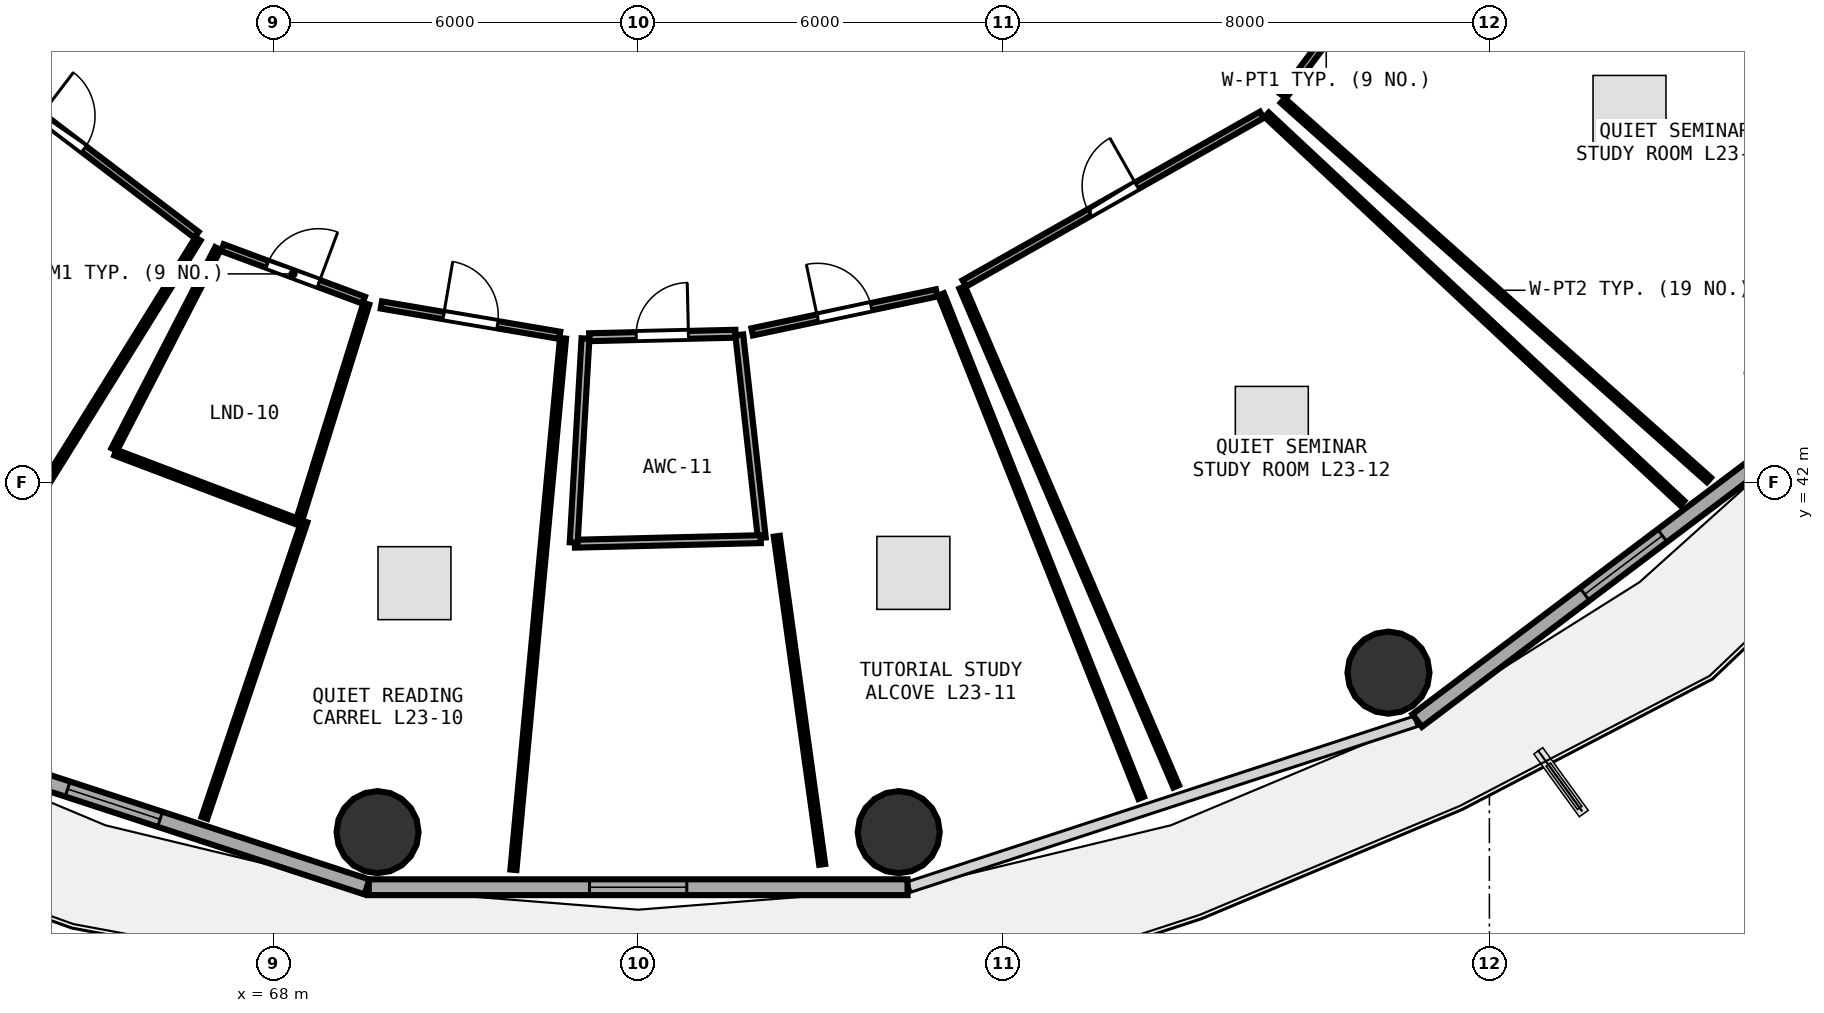
"""IFC4 building model, lengths in metres.
Left out: names, types, materials, properties, quantities, classifications, styles, units other than length and angle.
Written with IfcOpenShell. Run it as: python <this file> out.ifc"""

import sys

from ifc_helpers import new_model, si_unit, direction, frame, frame_2d, origin, origin_2d, place, context, subcontext, project, spatial, rectangle, circle, extrude, element, fill, save


model = new_model("IFC4")
c1 = context("Model", 3, precision=1e-05, world=origin(), true_north=direction((0.0, 1.0)))
c2 = subcontext(c1, "Body", "Model", "MODEL_VIEW")
j1 = project(units=[si_unit("LENGTHUNIT", "METRE"), si_unit("PLANEANGLEUNIT", "RADIAN")], contexts=[c1])
p1 = place(None, origin())
s1 = spatial("IfcSite", under=j1, at=p1, CompositionType="ELEMENT")
p2 = place(p1, origin())
s2 = spatial("IfcBuilding", under=s1, at=p2, CompositionType="ELEMENT")
p3 = place(p2, frame((0.0, 0.0, 91.35)))
s3 = spatial("IfcBuildingStorey", under=s2, at=p3, CompositionType="ELEMENT", Elevation=91.35)
for number, where, z_axis, x_axis in (
    (1, (69.714, 36.255, 0.0), (0.0, 0.0, 1.0), (1.0, 0.0, 0.0)),
    (2, (78.286, 36.255, 0.0), (0.0, 0.0, 1.0), (1.0, 0.0, 0.0)),
    (3, (86.34, 38.878, 0.0), (0.0, 0.0, 1.0), (1.0, 0.0, 0.0)),
):
    element("IfcColumn", number, at=place(p3, frame(where, z_axis=z_axis, x_axis=x_axis)), inside=s3, PredefinedType="COLUMN", context=c2, shape_type="SweptSolid", body=[
        extrude(circle(Radius=0.675, at=origin_2d()), origin(), (0.0, 0.0, 1.0), 3.75),
    ])
p4 = place(p3, frame((61.214, 38.077, 0.0), z_axis=(0.0, 0.0, 1.0), x_axis=(0.950471101963, -0.310812941064, 0.0)))
e4 = element("IfcWall", 4, at=p4, inside=s3, PredefinedType="SOLIDWALL", context=c2, shape_type="SweptSolid", body=[
    extrude(rectangle(XDim=8.76, YDim=0.26, at=frame_2d((4.38, 0.0))), origin(), (0.0, 0.0, 1.0), 3.475),
])
p5 = place(p4, frame((3.58, 0.0, 0.85)))
e5 = element("IfcOpeningElement", 5, at=p5, cuts=e4, PredefinedType="OPENING", context=c2, shape_type="SweptSolid", body=[
    extrude(rectangle(XDim=1.6, YDim=1.45, at=frame_2d((0.8, 0.725))), frame((0.0, 0.14, 0.0), z_axis=(0.0, -1.0, 0.0), x_axis=(1.0, 0.0, 0.0)), (0.0, 0.0, 1.0), 0.28),
])
p6 = place(p3, frame((69.57, 35.349, 0.0), z_axis=(0.0, 0.0, 1.0), x_axis=(1.0, 0.0, 0.0)))
e6 = element("IfcWall", 6, at=p6, inside=s3, PredefinedType="SOLIDWALL", context=c2, shape_type="SweptSolid", body=[
    extrude(rectangle(XDim=8.861, YDim=0.26, at=frame_2d((4.43, 0.0))), origin(), (0.0, 0.0, 1.0), 3.475),
])
p7 = place(p6, frame((3.63, 0.0, 0.85)))
e7 = element("IfcOpeningElement", 7, at=p7, cuts=e6, PredefinedType="OPENING", context=c2, shape_type="SweptSolid", body=[
    extrude(rectangle(XDim=1.6, YDim=1.45, at=frame_2d((0.8, 0.725))), frame((0.0, 0.14, 0.0), z_axis=(0.0, -1.0, 0.0), x_axis=(1.0, 0.0, 0.0)), (0.0, 0.0, 1.0), 0.28),
])
p8 = place(p3, frame((86.812, 38.09, 0.0), z_axis=(0.0, 0.0, 1.0), x_axis=(0.798501507879, 0.601992808857, 0.0)))
e8 = element("IfcWall", 8, at=p8, inside=s3, PredefinedType="SOLIDWALL", context=c2, shape_type="SweptSolid", body=[
    extrude(rectangle(XDim=8.499, YDim=0.26, at=frame_2d((4.25, 0.0))), origin(), (0.0, 0.0, 1.0), 3.475),
])
p9 = place(p8, frame((3.45, 0.0, 0.85)))
e9 = element("IfcOpeningElement", 9, at=p9, cuts=e8, PredefinedType="OPENING", context=c2, shape_type="SweptSolid", body=[
    extrude(rectangle(XDim=1.6, YDim=1.45, at=frame_2d((0.8, 0.725))), frame((0.0, 0.14, 0.0), z_axis=(0.0, -1.0, 0.0), x_axis=(1.0, 0.0, 0.0)), (0.0, 0.0, 1.0), 0.28),
])
p10 = place(p3, frame((62.318, 49.442, 0.0), z_axis=(0.0, 0.0, 1.0), x_axis=(0.795762794985, -0.605608432997, 0.0)))
e10 = element("IfcWall", 10, at=p10, inside=s3, PredefinedType="PARTITIONING", context=c2, shape_type="SweptSolid", body=[
    extrude(rectangle(XDim=5.55, YDim=0.12, at=frame_2d((2.775, 0.0))), origin(), (0.0, 0.0, 1.0), 2.925),
])
p11 = place(p10, frame((2.325, 0.0, 0.0)))
e11 = element("IfcOpeningElement", 11, at=p11, cuts=e10, PredefinedType="OPENING", context=c2, shape_type="SweptSolid", body=[
    extrude(rectangle(XDim=0.9, YDim=2.08, at=frame_2d((0.45, 1.04))), frame((0.0, 0.07, 0.0), z_axis=(0.0, -1.0, 0.0), x_axis=(1.0, 0.0, 0.0)), (0.0, 0.0, 1.0), 0.14),
])
p12 = place(p3, frame((67.162, 45.867, 0.0), z_axis=(0.0, 0.0, 1.0), x_axis=(0.937401389833, -0.348250821018, 0.0)))
e12 = element("IfcWall", 12, at=p12, inside=s3, PredefinedType="PARTITIONING", context=c2, shape_type="SweptSolid", body=[
    extrude(rectangle(XDim=2.479, YDim=0.12, at=frame_2d((1.24, 0.0))), origin(), (0.0, 0.0, 1.0), 2.925),
])
p13 = place(p12, frame((0.789, 0.0, 0.0)))
e13 = element("IfcOpeningElement", 13, at=p13, cuts=e12, PredefinedType="OPENING", context=c2, shape_type="SweptSolid", body=[
    extrude(rectangle(XDim=0.9, YDim=2.08, at=frame_2d((0.45, 1.04))), frame((0.0, 0.07, 0.0), z_axis=(0.0, -1.0, 0.0), x_axis=(1.0, 0.0, 0.0)), (0.0, 0.0, 1.0), 0.14),
])
p14 = place(p3, frame((69.777, 44.925, 0.0), z_axis=(0.0, 0.0, 1.0), x_axis=(0.985835901267, -0.167712777608, 0.0)))
e14 = element("IfcWall", 14, at=p14, inside=s3, PredefinedType="PARTITIONING", context=c2, shape_type="SweptSolid", body=[
    extrude(rectangle(XDim=2.974, YDim=0.12, at=frame_2d((1.487, 0.0))), origin(), (0.0, 0.0, 1.0), 3.48),
])
p15 = place(p14, frame((1.037, 0.0, 0.0)))
e15 = element("IfcOpeningElement", 15, at=p15, cuts=e14, PredefinedType="OPENING", context=c2, shape_type="SweptSolid", body=[
    extrude(rectangle(XDim=0.9, YDim=2.08, at=frame_2d((0.45, 1.04))), frame((0.0, 0.07, 0.0), z_axis=(0.0, -1.0, 0.0), x_axis=(1.0, 0.0, 0.0)), (0.0, 0.0, 1.0), 0.14),
])
p16 = place(p3, frame((73.195, 44.394, 0.0), z_axis=(0.0, 0.0, 1.0), x_axis=(0.999715810971, 0.023838986867, 0.0)))
e16 = element("IfcWall", 16, at=p16, inside=s3, PredefinedType="PLUMBINGWALL", context=c2, shape_type="SweptSolid", body=[
    extrude(rectangle(XDim=2.407, YDim=0.13, at=frame_2d((1.203, 0.0))), origin(), (0.0, 0.0, 1.0), 3.48),
])
p17 = place(p16, frame((0.773, 0.0, 0.0)))
e17 = element("IfcOpeningElement", 17, at=p17, cuts=e16, PredefinedType="OPENING", context=c2, shape_type="SweptSolid", body=[
    extrude(rectangle(XDim=0.86, YDim=2.05, at=frame_2d((0.43, 1.025))), frame((0.0, 0.075, 0.0), z_axis=(0.0, -1.0, 0.0), x_axis=(1.0, 0.0, 0.0)), (0.0, 0.0, 1.0), 0.15),
])
p18 = place(p3, frame((75.876, 44.482, 0.0), z_axis=(0.0, 0.0, 1.0), x_axis=(0.978387400111, 0.206780306856, 0.0)))
e18 = element("IfcWall", 18, at=p18, inside=s3, PredefinedType="PARTITIONING", context=c2, shape_type="SweptSolid", body=[
    extrude(rectangle(XDim=3.1, YDim=0.12, at=frame_2d((1.55, 0.0))), origin(), (0.0, 0.0, 1.0), 3.48),
])
p19 = place(p18, frame((1.1, 0.0, 0.0)))
e19 = element("IfcOpeningElement", 19, at=p19, cuts=e18, PredefinedType="OPENING", context=c2, shape_type="SweptSolid", body=[
    extrude(rectangle(XDim=0.9, YDim=2.08, at=frame_2d((0.45, 1.04))), frame((0.0, 0.07, 0.0), z_axis=(0.0, -1.0, 0.0), x_axis=(1.0, 0.0, 0.0)), (0.0, 0.0, 1.0), 0.14),
])
p20 = place(p3, frame((79.365, 45.28, 0.0), z_axis=(0.0, 0.0, 1.0), x_axis=(0.870068136537, 0.49293147372, 0.0)))
e20 = element("IfcWall", 20, at=p20, inside=s3, PredefinedType="PARTITIONING", context=c2, shape_type="SweptSolid", body=[
    extrude(rectangle(XDim=5.621, YDim=0.12, at=frame_2d((2.811, 0.0))), origin(), (0.0, 0.0, 1.0), 2.925),
])
p21 = place(p20, frame((2.36, 0.0, 0.0)))
e21 = element("IfcOpeningElement", 21, at=p21, cuts=e20, PredefinedType="OPENING", context=c2, shape_type="SweptSolid", body=[
    extrude(rectangle(XDim=0.9, YDim=2.08, at=frame_2d((0.45, 1.04))), frame((0.0, 0.07, 0.0), z_axis=(0.0, -1.0, 0.0), x_axis=(1.0, 0.0, 0.0)), (0.0, 0.0, 1.0), 0.14),
])
p22 = place(p3, frame((84.608, 48.36, 0.0), z_axis=(0.0, 0.0, 1.0), x_axis=(0.596833425992, 0.802365167251, 0.0)))
e22 = element("IfcWall", 22, at=p22, inside=s3, PredefinedType="PARTITIONING", context=c2, shape_type="SweptSolid", body=[
    extrude(rectangle(XDim=5.399, YDim=0.12, at=frame_2d((2.699, 0.0))), origin(), (0.0, 0.0, 1.0), 2.925),
])
p23 = place(p22, frame((2.249, 0.0, 0.0)))
e23 = element("IfcOpeningElement", 23, at=p23, cuts=e22, PredefinedType="OPENING", context=c2, shape_type="SweptSolid", body=[
    extrude(rectangle(XDim=0.9, YDim=2.08, at=frame_2d((0.45, 1.04))), frame((0.0, 0.07, 0.0), z_axis=(0.0, -1.0, 0.0), x_axis=(1.0, 0.0, 0.0)), (0.0, 0.0, 1.0), 0.14),
])
p24 = place(p3, frame((66.761, 46.01, 0.0), z_axis=(0.0, 0.0, 1.0), x_axis=(-0.528015738644, -0.849234584638, 0.0)))
e24 = element("IfcWall", 24, at=p24, inside=s3, PredefinedType="PARTITIONING", context=c2, shape_type="SweptSolid", body=[
    extrude(rectangle(XDim=8.338, YDim=0.1, at=frame_2d((4.169, 0.0))), origin(), (0.0, 0.0, 1.0), 3.175),
])
p25 = place(p3, frame((69.53, 44.945, 0.0), z_axis=(0.0, 0.0, 1.0), x_axis=(-0.296510682072, -0.955029536411, 0.0)))
e25 = element("IfcWall", 25, at=p25, inside=s3, PredefinedType="PARTITIONING", context=c2, shape_type="SweptSolid", body=[
    extrude(rectangle(XDim=3.72, YDim=0.1, at=frame_2d((1.86, 0.0))), origin(), (0.0, 0.0, 1.0), 2.925),
])
p26 = place(p3, frame((68.378, 41.368, 0.0), z_axis=(0.0, 0.0, 1.0), x_axis=(-0.935027341219, 0.354575621233, 0.0)))
e26 = element("IfcWall", 26, at=p26, inside=s3, PredefinedType="PARTITIONING", context=c2, shape_type="SweptSolid", body=[
    extrude(rectangle(XDim=3.183, YDim=0.1, at=frame_2d((1.592, 0.0))), origin(), (0.0, 0.0, 1.0), 2.925),
])
p27 = place(p3, frame((65.382, 42.546, 0.0), z_axis=(0.0, 0.0, 1.0), x_axis=(0.458413879464, 0.888738834031, 0.0)))
e27 = element("IfcWall", 27, at=p27, inside=s3, PredefinedType="PARTITIONING", context=c2, shape_type="SweptSolid", body=[
    extrude(rectangle(XDim=3.72, YDim=0.1, at=frame_2d((1.86, 0.0))), origin(), (0.0, 0.0, 1.0), 3.175),
])
p28 = place(p3, frame((72.764, 44.376, 0.0), z_axis=(0.0, 0.0, 1.0), x_axis=(-0.092917687898, -0.995673793607, 0.0)))
e28 = element("IfcWall", 28, at=p28, inside=s3, PredefinedType="PARTITIONING", context=c2, shape_type="SweptSolid", body=[
    extrude(rectangle(XDim=8.779, YDim=0.1, at=frame_2d((4.389, 0.0))), origin(), (0.0, 0.0, 1.0), 2.975),
])
p29 = place(p3, frame((66.867, 36.49, 0.0), z_axis=(0.0, 0.0, 1.0), x_axis=(0.319911741109, 0.947447348353, 0.0)))
e29 = element("IfcWall", 29, at=p29, inside=s3, PredefinedType="PARTITIONING", context=c2, shape_type="SweptSolid", body=[
    extrude(rectangle(XDim=5.146, YDim=0.1, at=frame_2d((2.573, 0.0))), origin(), (0.0, 0.0, 1.0), 2.925),
])
p30 = place(p3, frame((75.663, 44.433, 0.0), z_axis=(0.0, 0.0, 1.0), x_axis=(0.110311886913, -0.993897020624, 0.0)))
e30 = element("IfcWall", 30, at=p30, inside=s3, PredefinedType="PLUMBINGWALL", context=c2, shape_type="SweptSolid", body=[
    extrude(rectangle(XDim=3.36, YDim=0.13, at=frame_2d((1.68, 0.0))), origin(), (0.0, 0.0, 1.0), 3.175),
])
p31 = place(p3, frame((76.016, 41.073, 0.0), z_axis=(0.0, 0.0, 1.0), x_axis=(-0.999699597441, -0.024509485419, 0.0)))
e31 = element("IfcWall", 31, at=p31, inside=s3, PredefinedType="PLUMBINGWALL", context=c2, shape_type="SweptSolid", body=[
    extrude(rectangle(XDim=3.058, YDim=0.13, at=frame_2d((1.529, 0.0))), origin(), (0.0, 0.0, 1.0), 3.48),
])
p32 = place(p3, frame((72.94, 41.018, 0.0), z_axis=(0.0, 0.0, 1.0), x_axis=(0.057610459658, 0.998339138238, 0.0)))
e32 = element("IfcWall", 32, at=p32, inside=s3, PredefinedType="PLUMBINGWALL", context=c2, shape_type="SweptSolid", body=[
    extrude(rectangle(XDim=3.361, YDim=0.13, at=frame_2d((1.68, 0.0))), origin(), (0.0, 0.0, 1.0), 3.175),
])
p33 = place(p3, frame((78.983, 45.099, 0.0), z_axis=(0.0, 0.0, 1.0), x_axis=(0.369438475108, -0.929255192673, 0.0)))
e33 = element("IfcWall", 33, at=p33, inside=s3, PredefinedType="PARTITIONING", context=c2, shape_type="SweptSolid", body=[
    extrude(rectangle(XDim=8.909, YDim=0.1, at=frame_2d((4.455, 0.0))), origin(), (0.0, 0.0, 1.0), 2.925),
])
p34 = place(p3, frame((77.027, 35.725, 0.0), z_axis=(0.0, 0.0, 1.0), x_axis=(-0.136996790132, 0.990571491359, 0.0)))
e34 = element("IfcWall", 34, at=p34, inside=s3, PredefinedType="PARTITIONING", context=c2, shape_type="SweptSolid", body=[
    extrude(rectangle(XDim=5.448, YDim=0.1, at=frame_2d((2.724, 0.0))), origin(), (0.0, 0.0, 1.0), 2.975),
])
p35 = place(p3, frame((84.337, 48.053, 0.0), z_axis=(0.0, 0.0, 1.0), x_axis=(0.730663657097, -0.682737592489, 0.0)))
e35 = element("IfcWall", 35, at=p35, inside=s3, PredefinedType="PARTITIONING", context=c2, shape_type="SweptSolid", body=[
    extrude(rectangle(XDim=9.353, YDim=0.1, at=frame_2d((4.676, 0.0))), origin(), (0.0, 0.0, 1.0), 2.975),
])
p36 = place(p3, frame((82.849, 37.008, 0.0), z_axis=(0.0, 0.0, 1.0), x_axis=(-0.394269081074, 0.918995044442, 0.0)))
e36 = element("IfcWall", 36, at=p36, inside=s3, PredefinedType="PARTITIONING", context=c2, shape_type="SweptSolid", body=[
    extrude(rectangle(XDim=8.928, YDim=0.1, at=frame_2d((4.464, 0.0))), origin(), (0.0, 0.0, 1.0), 2.925),
])
p37 = place(p3, frame((91.611, 42.048, 0.0), z_axis=(0.0, 0.0, 1.0), x_axis=(-0.747021589751, 0.664799777713, 0.0)))
e37 = element("IfcWall", 37, at=p37, inside=s3, PredefinedType="PARTITIONING", context=c2, shape_type="SweptSolid", body=[
    extrude(rectangle(XDim=9.383, YDim=0.1, at=frame_2d((4.691, 0.0))), origin(), (0.0, 0.0, 1.0), 2.975),
])
p38 = place(p5, origin())
e38 = element("IfcWindow", 38, at=p38, inside=s3, PartitioningType="SINGLE_PANEL", PredefinedType="WINDOW", context=c2, shape_type="SweptSolid", body=[
    extrude(rectangle(XDim=1.6, YDim=1.45, at=frame_2d((0.8, 0.725))), frame((0.0, 0.03, 0.0), z_axis=(0.0, -1.0, 0.0), x_axis=(1.0, 0.0, 0.0)), (0.0, 0.0, 1.0), 0.06),
])
fill(e5, e38)
p39 = place(p7, origin())
e39 = element("IfcWindow", 39, at=p39, inside=s3, PartitioningType="SINGLE_PANEL", PredefinedType="WINDOW", context=c2, shape_type="SweptSolid", body=[
    extrude(rectangle(XDim=1.6, YDim=1.45, at=frame_2d((0.8, 0.725))), frame((0.0, 0.03, 0.0), z_axis=(0.0, -1.0, 0.0), x_axis=(1.0, 0.0, 0.0)), (0.0, 0.0, 1.0), 0.06),
])
fill(e7, e39)
p40 = place(p9, origin())
e40 = element("IfcWindow", 40, at=p40, inside=s3, PartitioningType="SINGLE_PANEL", PredefinedType="WINDOW", context=c2, shape_type="SweptSolid", body=[
    extrude(rectangle(XDim=1.6, YDim=1.45, at=frame_2d((0.8, 0.725))), frame((0.0, 0.03, 0.0), z_axis=(0.0, -1.0, 0.0), x_axis=(1.0, 0.0, 0.0)), (0.0, 0.0, 1.0), 0.06),
])
fill(e9, e40)
p41 = place(p11, origin())
e41 = element("IfcDoor", 41, at=p41, inside=s3, OperationType="SINGLE_SWING_LEFT", PredefinedType="DOOR", context=c2, shape_type="SweptSolid", body=[
    extrude(rectangle(XDim=0.9, YDim=2.08, at=frame_2d((0.45, 1.04))), frame((0.0, 0.025, 0.0), z_axis=(0.0, -1.0, 0.0), x_axis=(1.0, 0.0, 0.0)), (0.0, 0.0, 1.0), 0.05),
])
fill(e11, e41)
p42 = place(p13, origin())
e42 = element("IfcDoor", 42, at=p42, inside=s3, OperationType="SINGLE_SWING_RIGHT", PredefinedType="DOOR", context=c2, shape_type="SweptSolid", body=[
    extrude(rectangle(XDim=0.9, YDim=2.08, at=frame_2d((0.45, 1.04))), frame((0.0, 0.025, 0.0), z_axis=(0.0, -1.0, 0.0), x_axis=(1.0, 0.0, 0.0)), (0.0, 0.0, 1.0), 0.05),
])
fill(e13, e42)
p43 = place(p15, origin())
e43 = element("IfcDoor", 43, at=p43, inside=s3, OperationType="SINGLE_SWING_LEFT", PredefinedType="DOOR", context=c2, shape_type="SweptSolid", body=[
    extrude(rectangle(XDim=0.9, YDim=2.08, at=frame_2d((0.45, 1.04))), frame((0.0, 0.025, 0.0), z_axis=(0.0, -1.0, 0.0), x_axis=(1.0, 0.0, 0.0)), (0.0, 0.0, 1.0), 0.05),
])
fill(e15, e43)
p44 = place(p17, origin())
e44 = element("IfcDoor", 44, at=p44, inside=s3, OperationType="SINGLE_SWING_RIGHT", PredefinedType="DOOR", context=c2, shape_type="SweptSolid", body=[
    extrude(rectangle(XDim=0.86, YDim=2.05, at=frame_2d((0.43, 1.025))), frame((0.0, 0.025, 0.0), z_axis=(0.0, -1.0, 0.0), x_axis=(1.0, 0.0, 0.0)), (0.0, 0.0, 1.0), 0.05),
])
fill(e17, e44)
p45 = place(p19, origin())
e45 = element("IfcDoor", 45, at=p45, inside=s3, OperationType="SINGLE_SWING_LEFT", PredefinedType="DOOR", context=c2, shape_type="SweptSolid", body=[
    extrude(rectangle(XDim=0.9, YDim=2.08, at=frame_2d((0.45, 1.04))), frame((0.0, 0.025, 0.0), z_axis=(0.0, -1.0, 0.0), x_axis=(1.0, 0.0, 0.0)), (0.0, 0.0, 1.0), 0.05),
])
fill(e19, e45)
p46 = place(p21, origin())
e46 = element("IfcDoor", 46, at=p46, inside=s3, OperationType="SINGLE_SWING_RIGHT", PredefinedType="DOOR", context=c2, shape_type="SweptSolid", body=[
    extrude(rectangle(XDim=0.9, YDim=2.08, at=frame_2d((0.45, 1.04))), frame((0.0, 0.025, 0.0), z_axis=(0.0, -1.0, 0.0), x_axis=(1.0, 0.0, 0.0)), (0.0, 0.0, 1.0), 0.05),
])
fill(e21, e46)
save(model, sys.argv[1])
